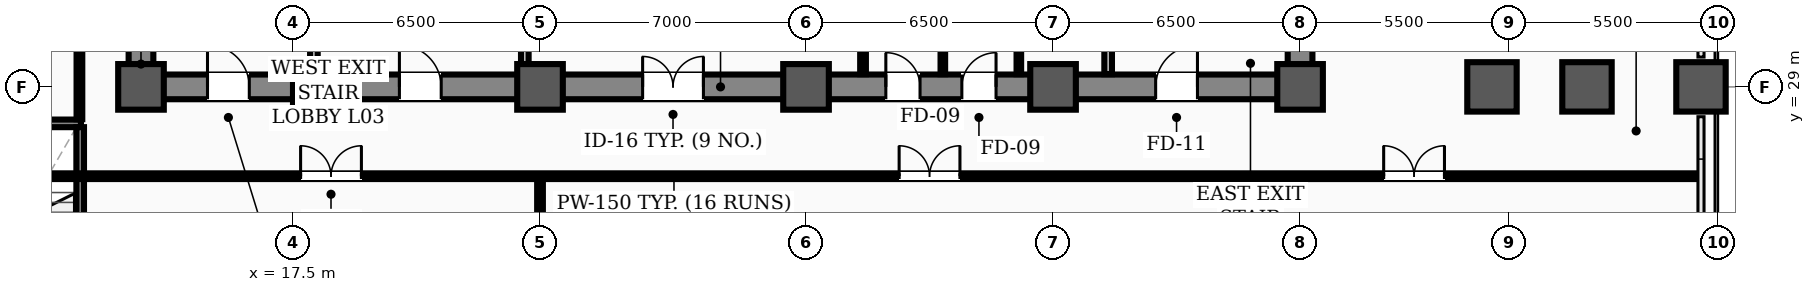
"""IFC4 building model, lengths in metres.
Left out: names, types, materials, properties, quantities, classifications, styles, units other than length and angle.
Written with IfcOpenShell. Run it as: python <this file> out.ifc"""

import sys

from ifc_helpers import new_model, si_unit, direction, frame, frame_2d, origin, origin_2d, place, context, subcontext, project, spatial, rectangle, hollow_rectangle, extrude, element, fill, save


model = new_model("IFC4")
c1 = context("Model", 3, precision=1e-05, world=origin(), true_north=direction((0.0, 1.0)))
c2 = subcontext(c1, "Body", "Model", "MODEL_VIEW")
j1 = project(units=[si_unit("LENGTHUNIT", "METRE"), si_unit("PLANEANGLEUNIT", "RADIAN")], contexts=[c1])
p1 = place(None, origin())
s1 = spatial("IfcSite", under=j1, at=p1, CompositionType="ELEMENT")
p2 = place(p1, origin())
s2 = spatial("IfcBuilding", under=s1, at=p2, CompositionType="ELEMENT")
p3 = place(p2, frame((0.0, 0.0, 11.2)))
s3 = spatial("IfcBuildingStorey", under=s2, at=p3, CompositionType="ELEMENT", Elevation=11.2)
for number, where, z_axis, x_axis in (
    (1, (13.5, 29.0, 0.0), (0.0, 0.0, 1.0), (1.0, 0.0, 0.0)),
    (2, (18.1, 29.0, 0.0), (0.0, 0.0, 1.0), (1.0, 0.0, 0.0)),
    (3, (24.0, 29.0, 0.0), (0.0, 0.0, 1.0), (1.0, 0.0, 0.0)),
    (4, (31.0, 29.0, 0.0), (0.0, 0.0, 1.0), (1.0, 0.0, 0.0)),
    (5, (37.5, 29.0, 0.0), (0.0, 0.0, 1.0), (1.0, 0.0, 0.0)),
    (6, (44.0, 29.0, 0.0), (0.0, 0.0, 1.0), (1.0, 0.0, 0.0)),
):
    element("IfcColumn", number, at=place(p3, frame(where, z_axis=z_axis, x_axis=x_axis)), inside=s3, PredefinedType="COLUMN", context=c2, shape_type="SweptSolid", body=[
        extrude(hollow_rectangle(XDim=1.2, YDim=1.2, WallThickness=0.04, InnerFilletRadius=0.02, OuterFilletRadius=0.06, at=origin_2d()), origin(), (0.0, 0.0, 1.0), 5.4),
    ])
for number, where, z_axis, x_axis in (
    (7, (49.05, 29.0, 0.0), (0.0, 0.0, 1.0), (1.0, 0.0, 0.0)),
    (8, (51.55, 29.0, 0.0), (0.0, 0.0, 1.0), (1.0, 0.0, 0.0)),
    (9, (54.55, 29.0, 0.0), (0.0, 0.0, 1.0), (1.0, 0.0, 0.0)),
):
    element("IfcColumn", number, at=place(p3, frame(where, z_axis=z_axis, x_axis=x_axis)), inside=s3, PredefinedType="COLUMN", context=c2, shape_type="SweptSolid", body=[
        extrude(rectangle(XDim=1.3, YDim=1.3, at=origin_2d()), origin(), (0.0, 0.0, 1.0), 5.4),
    ])
p4 = place(p3, frame((13.5, 29.0, 0.0), z_axis=(0.0, 0.0, 1.0), x_axis=(1.0, 0.0, 0.0)))
e10 = element("IfcWall", 10, at=p4, inside=s3, PredefinedType="SHEAR", context=c2, shape_type="SweptSolid", body=[
    extrude(rectangle(XDim=30.5, YDim=0.65, at=frame_2d((15.25, 0.0))), origin(), (0.0, 0.0, 1.0), 5.15),
])
p5 = place(p4, frame((1.75, 0.0, 0.0)))
e11 = element("IfcOpeningElement", 11, at=p5, cuts=e10, PredefinedType="OPENING", context=c2, shape_type="SweptSolid", body=[
    extrude(rectangle(XDim=1.1, YDim=2.08, at=frame_2d((0.55, 1.04))), frame((0.0, 0.335, 0.0), z_axis=(0.0, -1.0, 0.0), x_axis=(1.0, 0.0, 0.0)), (0.0, 0.0, 1.0), 0.67),
])
p6 = place(p4, frame((26.7, 0.0, 0.0)))
e12 = element("IfcOpeningElement", 12, at=p6, cuts=e10, PredefinedType="OPENING", context=c2, shape_type="SweptSolid", body=[
    extrude(rectangle(XDim=1.1, YDim=2.08, at=frame_2d((0.55, 1.04))), frame((0.0, 0.335, 0.0), z_axis=(0.0, -1.0, 0.0), x_axis=(1.0, 0.0, 0.0)), (0.0, 0.0, 1.0), 0.67),
])
p7 = place(p4, frame((6.8, 0.0, 0.0)))
e13 = element("IfcOpeningElement", 13, at=p7, cuts=e10, PredefinedType="OPENING", context=c2, shape_type="SweptSolid", body=[
    extrude(rectangle(XDim=1.1, YDim=2.08, at=frame_2d((0.55, 1.04))), frame((0.0, 0.335, 0.0), z_axis=(0.0, -1.0, 0.0), x_axis=(1.0, 0.0, 0.0)), (0.0, 0.0, 1.0), 0.67),
])
p8 = place(p4, frame((13.2, 0.0, 0.0)))
e14 = element("IfcOpeningElement", 14, at=p8, cuts=e10, PredefinedType="OPENING", context=c2, shape_type="SweptSolid", body=[
    extrude(rectangle(XDim=1.6, YDim=2.08, at=frame_2d((0.8, 1.04))), frame((0.0, 0.335, 0.0), z_axis=(0.0, -1.0, 0.0), x_axis=(1.0, 0.0, 0.0)), (0.0, 0.0, 1.0), 0.67),
])
p9 = place(p4, frame((19.6, 0.0, 0.0)))
e15 = element("IfcOpeningElement", 15, at=p9, cuts=e10, PredefinedType="OPENING", context=c2, shape_type="SweptSolid", body=[
    extrude(rectangle(XDim=0.9, YDim=2.08, at=frame_2d((0.45, 1.04))), frame((0.0, 0.335, 0.0), z_axis=(0.0, -1.0, 0.0), x_axis=(1.0, 0.0, 0.0)), (0.0, 0.0, 1.0), 0.67),
])
p10 = place(p4, frame((21.6, 0.0, 0.0)))
e16 = element("IfcOpeningElement", 16, at=p10, cuts=e10, PredefinedType="OPENING", context=c2, shape_type="SweptSolid", body=[
    extrude(rectangle(XDim=0.9, YDim=2.08, at=frame_2d((0.45, 1.04))), frame((0.0, 0.335, 0.0), z_axis=(0.0, -1.0, 0.0), x_axis=(1.0, 0.0, 0.0)), (0.0, 0.0, 1.0), 0.67),
])
for number, where, z_axis, x_axis in (
    (17, (13.5, 29.35, 0.0), (0.0, 0.0, 1.0), (0.0, 1.0, 0.0)),
    (18, (44.0, 29.35, 0.0), (0.0, 0.0, 1.0), (0.0, 1.0, 0.0)),
):
    element("IfcWall", number, at=place(p3, frame(where, z_axis=z_axis, x_axis=x_axis)), inside=s3, PredefinedType="SHEAR", context=c2, shape_type="SweptSolid", body=[
        extrude(rectangle(XDim=8.6, YDim=0.65, at=frame_2d((4.3, 0.0))), origin(), (0.0, 0.0, 1.0), 5.15),
    ])
p11 = place(p3, frame((8.56, 28.04, 0.0), z_axis=(0.0, 0.0, 1.0), x_axis=(1.0, 0.0, 0.0)))
e19 = element("IfcWall", 19, at=p11, inside=s3, PredefinedType="STANDARD", context=c2, shape_type="SweptSolid", body=[
    extrude(rectangle(XDim=3.36, YDim=0.2, at=frame_2d((1.68, 0.0))), origin(), (0.0, 0.0, 1.0), 5.15),
])
p12 = place(p3, frame((11.9, 21.1, 0.0), z_axis=(0.0, 0.0, 1.0), x_axis=(0.0, 1.0, 0.0)))
e20 = element("IfcWall", 20, at=p12, inside=s3, PredefinedType="STANDARD", context=c2, shape_type="SweptSolid", body=[
    extrude(rectangle(XDim=6.84, YDim=0.2, at=frame_2d((3.42, 0.0))), origin(), (0.0, 0.0, 1.0), 5.15),
])
p13 = place(p3, frame((0.58, 26.65, 0.0), z_axis=(0.0, 0.0, 1.0), x_axis=(1.0, 0.0, 0.0)))
e21 = element("IfcWall", 21, at=p13, inside=s3, PredefinedType="PARTITIONING", context=c2, shape_type="SweptSolid", body=[
    extrude(rectangle(XDim=53.89, YDim=0.15, at=frame_2d((26.945, 0.0))), origin(), (0.0, 0.0, 1.0), 4.43),
])
p14 = place(p13, frame((17.12, 0.0, 0.0)))
e22 = element("IfcOpeningElement", 22, at=p14, cuts=e21, PredefinedType="OPENING", context=c2, shape_type="SweptSolid", body=[
    extrude(rectangle(XDim=1.6, YDim=2.08, at=frame_2d((0.8, 1.04))), frame((0.0, 0.085, 0.0), z_axis=(0.0, -1.0, 0.0), x_axis=(1.0, 0.0, 0.0)), (0.0, 0.0, 1.0), 0.17),
])
p15 = place(p13, frame((32.87, 0.0, 0.0)))
e23 = element("IfcOpeningElement", 23, at=p15, cuts=e21, PredefinedType="OPENING", context=c2, shape_type="SweptSolid", body=[
    extrude(rectangle(XDim=1.6, YDim=2.08, at=frame_2d((0.8, 1.04))), frame((0.0, 0.085, 0.0), z_axis=(0.0, -1.0, 0.0), x_axis=(1.0, 0.0, 0.0)), (0.0, 0.0, 1.0), 0.17),
])
p16 = place(p13, frame((45.62, 0.0, 0.0)))
e24 = element("IfcOpeningElement", 24, at=p16, cuts=e21, PredefinedType="OPENING", context=c2, shape_type="SweptSolid", body=[
    extrude(rectangle(XDim=1.6, YDim=2.08, at=frame_2d((0.8, 1.04))), frame((0.0, 0.085, 0.0), z_axis=(0.0, -1.0, 0.0), x_axis=(1.0, 0.0, 0.0)), (0.0, 0.0, 1.0), 0.17),
])
p17 = place(p3, frame((24.0, 3.53, 0.0), z_axis=(0.0, 0.0, 1.0), x_axis=(0.0, 1.0, 0.0)))
e25 = element("IfcWall", 25, at=p17, inside=s3, PredefinedType="PARTITIONING", context=c2, shape_type="SweptSolid", body=[
    extrude(rectangle(XDim=23.035, YDim=0.15, at=frame_2d((11.518, 0.0))), origin(), (0.0, 0.0, 1.0), 4.33),
])
p18 = place(p3, frame((11.88, 28.15, 0.0), z_axis=(0.0, 0.0, 1.0), x_axis=(0.0, 1.0, 0.0)))
e26 = element("IfcWall", 26, at=p18, inside=s3, PredefinedType="PARTITIONING", context=c2, shape_type="SweptSolid", body=[
    extrude(rectangle(XDim=12.165, YDim=0.15, at=frame_2d((6.083, 0.0))), origin(), (0.0, 0.0, 1.0), 4.33),
])
for number, where, z_axis, x_axis in (
    (27, (18.05, 29.335, 0.0), (0.0, 0.0, 1.0), (0.0, 1.0, 0.0)),
    (28, (38.95, 29.335, 0.0), (0.0, 0.0, 1.0), (0.0, 1.0, 0.0)),
):
    element("IfcWall", number, at=place(p3, frame(where, z_axis=z_axis, x_axis=x_axis)), inside=s3, PredefinedType="STANDARD", context=c2, shape_type="SweptSolid", body=[
        extrude(rectangle(XDim=0.965, YDim=0.2, at=frame_2d((0.482, 0.0))), origin(), (0.0, 0.0, 1.0), 4.33),
    ])
p19 = place(p3, frame((23.6, 29.335, 0.0), z_axis=(0.0, 0.0, 1.0), x_axis=(0.0, 1.0, 0.0)))
e29 = element("IfcWall", 29, at=p19, inside=s3, PredefinedType="STANDARD", context=c2, shape_type="SweptSolid", body=[
    extrude(rectangle(XDim=5.365, YDim=0.2, at=frame_2d((2.683, 0.0))), origin(), (0.0, 0.0, 1.0), 4.33),
])
p20 = place(p3, frame((32.5, 29.335, 0.0), z_axis=(0.0, 0.0, 1.0), x_axis=(0.0, 1.0, 0.0)))
e30 = element("IfcWall", 30, at=p20, inside=s3, PredefinedType="PARTITIONING", context=c2, shape_type="SweptSolid", body=[
    extrude(rectangle(XDim=2.43, YDim=0.15, at=frame_2d((1.215, 0.0))), origin(), (0.0, 0.0, 1.0), 4.33),
])
for number, where, z_axis, x_axis in (
    (31, (36.6, 29.335, 0.0), (0.0, 0.0, 1.0), (0.0, 1.0, 0.0)),
    (32, (34.6, 29.335, 0.0), (0.0, 0.0, 1.0), (0.0, 1.0, 0.0)),
):
    element("IfcWall", number, at=place(p3, frame(where, z_axis=z_axis, x_axis=x_axis)), inside=s3, PredefinedType="PARTITIONING", context=c2, shape_type="SweptSolid", body=[
        extrude(rectangle(XDim=2.43, YDim=0.12, at=frame_2d((1.215, 0.0))), origin(), (0.0, 0.0, 1.0), 4.33),
    ])
p21 = place(p14, origin())
e33 = element("IfcDoor", 33, at=p21, inside=s3, OperationType="DOUBLE_DOOR_SINGLE_SWING", PredefinedType="DOOR", context=c2, shape_type="SweptSolid", body=[
    extrude(rectangle(XDim=1.6, YDim=2.08, at=frame_2d((0.8, 1.04))), frame((0.0, 0.025, 0.0), z_axis=(0.0, -1.0, 0.0), x_axis=(1.0, 0.0, 0.0)), (0.0, 0.0, 1.0), 0.05),
])
fill(e22, e33)
p22 = place(p15, origin())
e34 = element("IfcDoor", 34, at=p22, inside=s3, OperationType="DOUBLE_DOOR_SINGLE_SWING", PredefinedType="DOOR", context=c2, shape_type="SweptSolid", body=[
    extrude(rectangle(XDim=1.6, YDim=2.08, at=frame_2d((0.8, 1.04))), frame((0.0, 0.025, 0.0), z_axis=(0.0, -1.0, 0.0), x_axis=(1.0, 0.0, 0.0)), (0.0, 0.0, 1.0), 0.05),
])
fill(e23, e34)
p23 = place(p16, origin())
e35 = element("IfcDoor", 35, at=p23, inside=s3, OperationType="DOUBLE_DOOR_SINGLE_SWING", PredefinedType="DOOR", context=c2, shape_type="SweptSolid", body=[
    extrude(rectangle(XDim=1.6, YDim=2.08, at=frame_2d((0.8, 1.04))), frame((0.0, 0.025, 0.0), z_axis=(0.0, -1.0, 0.0), x_axis=(1.0, 0.0, 0.0)), (0.0, 0.0, 1.0), 0.05),
])
fill(e24, e35)
p24 = place(p5, origin())
e36 = element("IfcDoor", 36, at=p24, inside=s3, OperationType="SINGLE_SWING_LEFT", PredefinedType="DOOR", context=c2, shape_type="SweptSolid", body=[
    extrude(rectangle(XDim=1.1, YDim=2.08, at=frame_2d((0.55, 1.04))), frame((0.0, 0.025, 0.0), z_axis=(0.0, -1.0, 0.0), x_axis=(1.0, 0.0, 0.0)), (0.0, 0.0, 1.0), 0.05),
])
fill(e11, e36)
p25 = place(p6, origin())
e37 = element("IfcDoor", 37, at=p25, inside=s3, OperationType="SINGLE_SWING_RIGHT", PredefinedType="DOOR", context=c2, shape_type="SweptSolid", body=[
    extrude(rectangle(XDim=1.1, YDim=2.08, at=frame_2d((0.55, 1.04))), frame((0.0, 0.025, 0.0), z_axis=(0.0, -1.0, 0.0), x_axis=(1.0, 0.0, 0.0)), (0.0, 0.0, 1.0), 0.05),
])
fill(e12, e37)
p26 = place(p7, origin())
e38 = element("IfcDoor", 38, at=p26, inside=s3, OperationType="SINGLE_SWING_LEFT", PredefinedType="DOOR", context=c2, shape_type="SweptSolid", body=[
    extrude(rectangle(XDim=1.1, YDim=2.08, at=frame_2d((0.55, 1.04))), frame((0.0, 0.025, 0.0), z_axis=(0.0, -1.0, 0.0), x_axis=(1.0, 0.0, 0.0)), (0.0, 0.0, 1.0), 0.05),
])
fill(e13, e38)
p27 = place(p8, origin())
e39 = element("IfcDoor", 39, at=p27, inside=s3, OperationType="DOUBLE_DOOR_SINGLE_SWING", PredefinedType="DOOR", context=c2, shape_type="SweptSolid", body=[
    extrude(rectangle(XDim=1.6, YDim=2.08, at=frame_2d((0.8, 1.04))), frame((0.0, 0.025, 0.0), z_axis=(0.0, -1.0, 0.0), x_axis=(1.0, 0.0, 0.0)), (0.0, 0.0, 1.0), 0.05),
])
fill(e14, e39)
p28 = place(p9, origin())
e40 = element("IfcDoor", 40, at=p28, inside=s3, OperationType="SINGLE_SWING_LEFT", PredefinedType="DOOR", context=c2, shape_type="SweptSolid", body=[
    extrude(rectangle(XDim=0.9, YDim=2.08, at=frame_2d((0.45, 1.04))), frame((0.0, 0.025, 0.0), z_axis=(0.0, -1.0, 0.0), x_axis=(1.0, 0.0, 0.0)), (0.0, 0.0, 1.0), 0.05),
])
fill(e15, e40)
p29 = place(p10, origin())
e41 = element("IfcDoor", 41, at=p29, inside=s3, OperationType="SINGLE_SWING_RIGHT", PredefinedType="DOOR", context=c2, shape_type="SweptSolid", body=[
    extrude(rectangle(XDim=0.9, YDim=2.08, at=frame_2d((0.45, 1.04))), frame((0.0, 0.025, 0.0), z_axis=(0.0, -1.0, 0.0), x_axis=(1.0, 0.0, 0.0)), (0.0, 0.0, 1.0), 0.05),
])
fill(e16, e41)
save(model, sys.argv[1])
